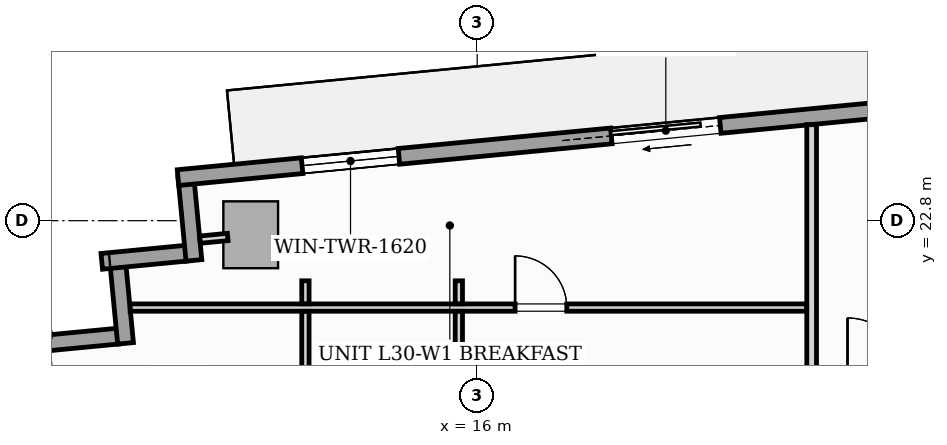
"""IFC4 building model, lengths in metres.
Left out: names, types, materials, properties, quantities, classifications, styles, units other than length and angle.
Written with IfcOpenShell. Run it as: python <this file> out.ifc"""

import sys

from ifc_helpers import new_model, si_unit, direction, frame, frame_2d, origin, origin_2d, place, context, subcontext, project, spatial, rectangle, extrude, source, transform, mapped, element, fill, save


model = new_model("IFC4")
c1 = context("Model", 3, precision=1e-05, world=origin(), true_north=direction((0.0, 1.0)))
c2 = subcontext(c1, "Body", "Model", "MODEL_VIEW")
j1 = project(units=[si_unit("LENGTHUNIT", "METRE"), si_unit("PLANEANGLEUNIT", "RADIAN")], contexts=[c1])
p1 = place(None, origin())
s1 = spatial("IfcSite", under=j1, at=p1, CompositionType="ELEMENT")
p2 = place(p1, origin())
s2 = spatial("IfcBuilding", under=s1, at=p2, CompositionType="ELEMENT")
p3 = place(p2, frame((0.0, 0.0, 106.6)))
s3 = spatial("IfcBuildingStorey", under=s2, at=p3, CompositionType="ELEMENT", Elevation=106.6)
m1 = source(origin(), c2, "Body", "SweptSolid", [
    extrude(rectangle(XDim=0.9, YDim=1.1, at=origin_2d()), origin(), (0.0, 0.0, 1.0), 3.196),
])
p4 = place(p3, frame((12.275, 22.568, 0.002), z_axis=(0.0, 0.0, 1.0), x_axis=(0.995396198367, 0.09584575252, 0.0)))
e1 = element("IfcColumn", 1, at=p4, inside=s3, PredefinedType="COLUMN", context=c2, shape_type="MappedRepresentation", body=[
    mapped(m1, transform((0.0, 0.0, 0.0), scale=1.0)),
])
for number, where, z_axis, x_axis in (
    (2, (8.701, 20.767, 0.0), (0.0, 0.0, 1.0), (0.995, 0.096, 0.0)),
    (3, (10.217, 20.783, 0.0), (0.0, 0.0, 1.0), (-0.096, 0.995, 0.0)),
):
    element("IfcWall", number, at=place(p3, frame(where, z_axis=z_axis, x_axis=x_axis)), inside=s3, PredefinedType="STANDARD", context=c2, shape_type="SweptSolid", body=[
        extrude(rectangle(XDim=1.395, YDim=0.26, at=frame_2d((0.698, 0.0))), origin(), (0.0, 0.0, 1.0), 2.94),
    ])
p5 = place(p3, frame((9.826, 22.131, 0.0), z_axis=(0.0, 0.0, 1.0), x_axis=(0.995389446633, 0.095915846097, 0.0)))
e4 = element("IfcWall", 4, at=p5, inside=s3, PredefinedType="STANDARD", context=c2, shape_type="SweptSolid", body=[
    extrude(rectangle(XDim=1.395, YDim=0.26, at=frame_2d((0.697, 0.0))), origin(), (0.0, 0.0, 1.0), 2.94),
])
p6 = place(p3, frame((11.341, 22.147, 0.0), z_axis=(0.0, 0.0, 1.0), x_axis=(-0.09589913835, 0.995391056452, 0.0)))
e5 = element("IfcWall", 5, at=p6, inside=s3, PredefinedType="STANDARD", context=c2, shape_type="SweptSolid", body=[
    extrude(rectangle(XDim=1.395, YDim=0.26, at=frame_2d((0.698, 0.0))), origin(), (0.0, 0.0, 1.0), 2.94),
])
p7 = place(p3, frame((11.08, 23.508, 0.0), z_axis=(0.0, 0.0, 1.0), x_axis=(0.995396638587, 0.095841180552, 0.0)))
e6 = element("IfcWall", 6, at=p7, inside=s3, PredefinedType="STANDARD", context=c2, shape_type="SweptSolid", body=[
    extrude(rectangle(XDim=19.11, YDim=0.26, at=frame_2d((9.555, 0.0))), origin(), (0.0, 0.0, 1.0), 2.94),
])
p8 = place(p7, frame((7.159, 0.0, 0.0)))
e7 = element("IfcOpeningElement", 7, at=p8, cuts=e6, PredefinedType="OPENING", context=c2, shape_type="SweptSolid", body=[
    extrude(rectangle(XDim=1.8, YDim=2.06, at=frame_2d((0.9, 1.03))), frame((0.0, 0.14, 0.0), z_axis=(0.0, -1.0, 0.0), x_axis=(1.0, 0.0, 0.0)), (0.0, 0.0, 1.0), 0.28),
])
p9 = place(p7, frame((2.05, 0.0, 0.65)))
e8 = element("IfcOpeningElement", 8, at=p9, cuts=e6, PredefinedType="OPENING", context=c2, shape_type="SweptSolid", body=[
    extrude(rectangle(XDim=1.6, YDim=1.5, at=frame_2d((0.8, 0.75))), frame((0.0, 0.14, 0.0), z_axis=(0.0, -1.0, 0.0), x_axis=(1.0, 0.0, 0.0)), (0.0, 0.0, 1.0), 0.28),
])
p10 = place(p3, frame((21.5, 12.632, 0.0), z_axis=(0.0, 0.0, 1.0), x_axis=(0.0, 1.0, 0.0)))
e9 = element("IfcWall", 9, at=p10, inside=s3, PredefinedType="PARTITIONING", context=c2, shape_type="SweptSolid", body=[
    extrude(rectangle(XDim=11.747, YDim=0.16, at=frame_2d((5.873, 0.0))), origin(), (0.0, 0.0, 1.0), 2.94),
])
p11 = place(p10, frame((0.493, 0.0, 0.0)))
e10 = element("IfcOpeningElement", 10, at=p11, cuts=e9, PredefinedType="OPENING", context=c2, shape_type="SweptSolid", body=[
    extrude(rectangle(XDim=0.95, YDim=2.06, at=frame_2d((0.475, 1.03))), frame((0.0, 0.09, 0.0), z_axis=(0.0, -1.0, 0.0), x_axis=(1.0, 0.0, 0.0)), (0.0, 0.0, 1.0), 0.18),
])
p12 = place(p3, frame((10.293, 21.371, 0.0), z_axis=(0.0, 0.0, 1.0), x_axis=(1.0, 0.0, 0.0)))
e11 = element("IfcWall", 11, at=p12, inside=s3, PredefinedType="PARTITIONING", context=c2, shape_type="SweptSolid", body=[
    extrude(rectangle(XDim=11.125, YDim=0.12, at=frame_2d((5.562, 0.0))), origin(), (0.0, 0.0, 1.0), 2.94),
])
p13 = place(p12, frame((6.33, 0.0, 0.0)))
e12 = element("IfcOpeningElement", 12, at=p13, cuts=e11, PredefinedType="OPENING", context=c2, shape_type="SweptSolid", body=[
    extrude(rectangle(XDim=0.85, YDim=2.05, at=frame_2d((0.425, 1.025))), frame((0.0, 0.07, 0.0), z_axis=(0.0, -1.0, 0.0), x_axis=(1.0, 0.0, 0.0)), (0.0, 0.0, 1.0), 0.14),
])
p14 = place(p3, frame((13.175, 10.699, 0.0), z_axis=(0.0, 0.0, 1.0), x_axis=(0.0, 1.0, 0.0)))
e13 = element("IfcWall", 13, at=p14, inside=s3, PredefinedType="PARTITIONING", context=c2, shape_type="SweptSolid", body=[
    extrude(rectangle(XDim=10.61, YDim=0.12, at=frame_2d((5.305, 0.0))), origin(), (0.0, 0.0, 1.0), 2.94),
])
p15 = place(p14, frame((4.88, 0.0, 0.0)))
e14 = element("IfcOpeningElement", 14, at=p15, cuts=e13, PredefinedType="OPENING", context=c2, shape_type="SweptSolid", body=[
    extrude(rectangle(XDim=0.85, YDim=2.05, at=frame_2d((0.425, 1.025))), frame((0.0, 0.07, 0.0), z_axis=(0.0, -1.0, 0.0), x_axis=(1.0, 0.0, 0.0)), (0.0, 0.0, 1.0), 0.14),
])
p16 = place(p3, frame((13.175, 21.433, 0.0), z_axis=(0.0, 0.0, 1.0), x_axis=(0.0, 1.0, 0.0)))
e15 = element("IfcWall", 15, at=p16, inside=s3, PredefinedType="PARTITIONING", context=c2, shape_type="SweptSolid", body=[
    extrude(rectangle(XDim=0.378, YDim=0.12, at=frame_2d((0.189, 0.0))), origin(), (0.0, 0.0, 1.0), 2.94),
])
p17 = place(p3, frame((15.698, 10.699, 0.0), z_axis=(0.0, 0.0, 1.0), x_axis=(0.0, 1.0, 0.0)))
e16 = element("IfcWall", 16, at=p17, inside=s3, PredefinedType="PARTITIONING", context=c2, shape_type="SweptSolid", body=[
    extrude(rectangle(XDim=10.61, YDim=0.12, at=frame_2d((5.305, 0.0))), origin(), (0.0, 0.0, 1.0), 2.94),
])
p18 = place(p17, frame((4.88, 0.0, 0.0)))
e17 = element("IfcOpeningElement", 17, at=p18, cuts=e16, PredefinedType="OPENING", context=c2, shape_type="SweptSolid", body=[
    extrude(rectangle(XDim=0.85, YDim=2.05, at=frame_2d((0.425, 1.025))), frame((0.0, 0.07, 0.0), z_axis=(0.0, -1.0, 0.0), x_axis=(1.0, 0.0, 0.0)), (0.0, 0.0, 1.0), 0.14),
])
p19 = place(p3, frame((15.698, 21.433, 0.0), z_axis=(0.0, 0.0, 1.0), x_axis=(0.0, 1.0, 0.0)))
e18 = element("IfcWall", 18, at=p19, inside=s3, PredefinedType="PARTITIONING", context=c2, shape_type="SweptSolid", body=[
    extrude(rectangle(XDim=0.378, YDim=0.12, at=frame_2d((0.189, 0.0))), origin(), (0.0, 0.0, 1.0), 2.94),
])
p20 = place(p3, frame((11.897, 22.532, 0.0), z_axis=(0.0, 0.0, 1.0), x_axis=(-0.995384576284, -0.09596637586, 0.0)))
e19 = element("IfcWall", 19, at=p20, inside=s3, PredefinedType="PARTITIONING", context=c2, shape_type="SweptSolid", body=[
    extrude(rectangle(XDim=0.458, YDim=0.12, at=frame_2d((0.229, 0.0))), origin(), (0.0, 0.0, 1.0), 2.94),
])
m2 = source(origin(), c2, "Body", "SweptSolid", [
    extrude(rectangle(XDim=1.8, YDim=2.06, at=frame_2d((0.9, 1.03))), frame((0.0, 0.025, 0.0), z_axis=(0.0, -1.0, 0.0), x_axis=(1.0, 0.0, 0.0)), (0.0, 0.0, 1.0), 0.05),
])
p21 = place(p8, origin())
e20 = element("IfcDoor", 20, at=p21, inside=s3, OperationType="SLIDING_TO_LEFT", PredefinedType="DOOR", context=c2, shape_type="MappedRepresentation", body=[
    mapped(m2, transform((0.0, 0.0, 0.0), scale=1.0)),
])
fill(e7, e20)
m3 = source(origin(), c2, "Body", "SweptSolid", [
    extrude(rectangle(XDim=1.6, YDim=1.5, at=frame_2d((0.8, 0.75))), frame((0.0, 0.03, 0.0), z_axis=(0.0, -1.0, 0.0), x_axis=(1.0, 0.0, 0.0)), (0.0, 0.0, 1.0), 0.06),
])
p22 = place(p9, origin())
e21 = element("IfcWindow", 21, at=p22, inside=s3, PartitioningType="SINGLE_PANEL", PredefinedType="WINDOW", context=c2, shape_type="MappedRepresentation", body=[
    mapped(m3, transform((0.0, 0.0, 0.0), scale=1.0)),
])
fill(e8, e21)
m4 = source(origin(), c2, "Body", "SweptSolid", [
    extrude(rectangle(XDim=0.85, YDim=2.05, at=frame_2d((0.425, 1.025))), frame((0.0, 0.025, 0.0), z_axis=(0.0, -1.0, 0.0), x_axis=(1.0, 0.0, 0.0)), (0.0, 0.0, 1.0), 0.05),
])
p23 = place(p13, origin())
e22 = element("IfcDoor", 22, at=p23, inside=s3, OperationType="SINGLE_SWING_LEFT", PredefinedType="DOOR", context=c2, shape_type="MappedRepresentation", body=[
    mapped(m4, transform((0.0, 0.0, 0.0), scale=1.0)),
])
fill(e12, e22)
save(model, sys.argv[1])
